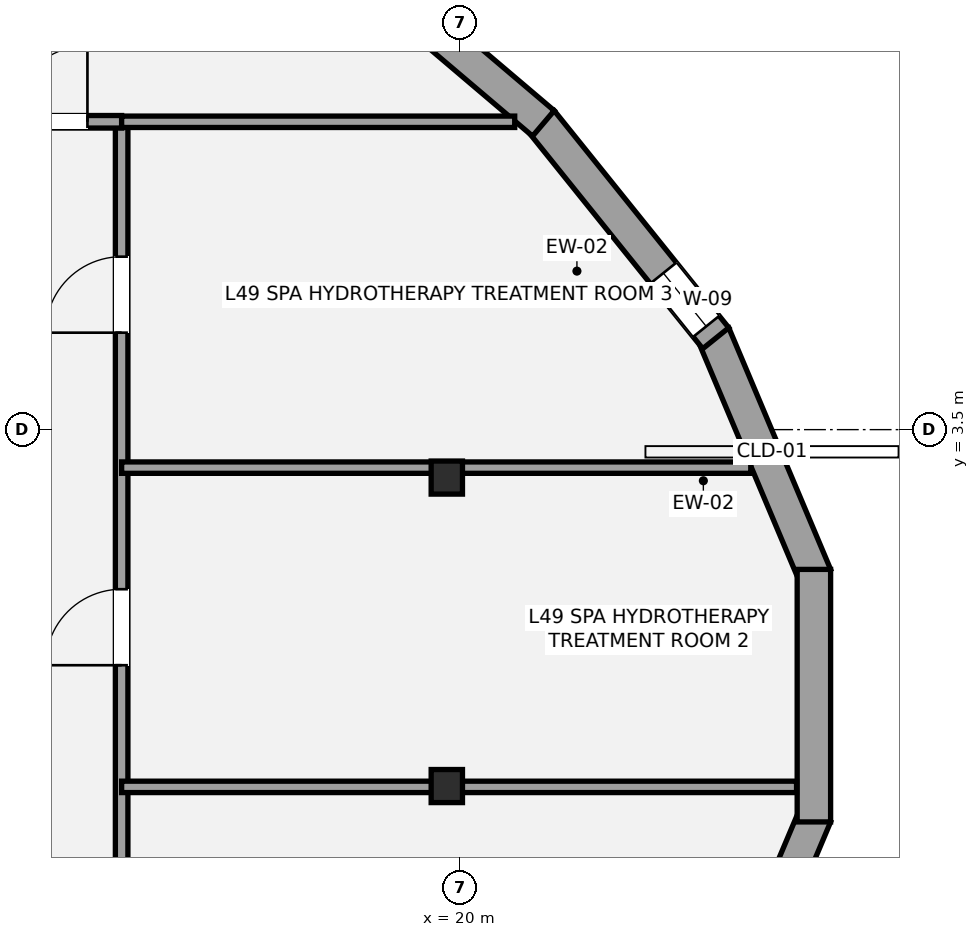
"""IFC4 building model, lengths in metres.
Left out: names, types, materials, properties, quantities, classifications, styles, units other than length and angle.
Written with IfcOpenShell. Run it as: python <this file> out.ifc"""

import sys

from ifc_helpers import new_model, si_unit, direction, frame, frame_2d, origin, origin_2d, place, context, subcontext, project, spatial, rectangle, i_section, extrude, element, fill, save


model = new_model("IFC4")
c1 = context("Model", 3, precision=1e-05, world=origin(), true_north=direction((0.0, 1.0)))
c2 = subcontext(c1, "Body", "Model", "MODEL_VIEW")
j1 = project(units=[si_unit("LENGTHUNIT", "METRE"), si_unit("PLANEANGLEUNIT", "RADIAN")], contexts=[c1])
p1 = place(None, origin())
s1 = spatial("IfcSite", under=j1, at=p1, CompositionType="ELEMENT")
p2 = place(p1, origin())
s2 = spatial("IfcBuilding", under=s1, at=p2, CompositionType="ELEMENT")
p3 = place(p2, frame((0.0, 0.0, 179.0)))
s3 = spatial("IfcBuildingStorey", under=s2, at=p3, CompositionType="ELEMENT", Elevation=179.0)
for number, where, z_axis, x_axis in (
    (1, (19.828, 2.869, 0.0), (0.0, 0.0, 1.0), (1.0, 0.0, 0.0)),
    (2, (19.828, -1.189, 0.0), (0.0, 0.0, 1.0), (1.0, 0.0, 0.0)),
):
    element("IfcColumn", number, at=place(p3, frame(where, z_axis=z_axis, x_axis=x_axis)), inside=s3, PredefinedType="COLUMN", context=c2, shape_type="SweptSolid", body=[
        extrude(i_section(OverallWidth=0.412, OverallDepth=0.435, WebThickness=0.036, FlangeThickness=0.057, at=origin_2d()), origin(), (0.0, 0.0, 1.0), 3.2),
    ])
p4 = place(p3, frame((23.335, 4.755, 0.0), z_axis=(0.0, 0.0, 1.0), x_axis=(0.388360687569, -0.9215074478, 0.0)))
e3 = element("IfcWall", 3, at=p4, inside=s3, PredefinedType="STANDARD", context=c2, shape_type="SweptSolid", body=[
    extrude(rectangle(XDim=3.45, YDim=0.44, at=frame_2d((1.725, 0.0))), origin(), (0.0, 0.0, 1.0), 2.315),
])
p5 = place(p3, frame((21.07, 7.559, 0.0), z_axis=(0.0, 0.0, 1.0), x_axis=(0.626642586146, -0.779306787618, 0.0)))
e4 = element("IfcWall", 4, at=p5, inside=s3, PredefinedType="STANDARD", context=c2, shape_type="SweptSolid", body=[
    extrude(rectangle(XDim=3.665, YDim=0.44, at=frame_2d((1.833, 0.0))), origin(), (0.0, 0.0, 1.0), 2.315),
])
p6 = place(p5, frame((2.565, 0.0, 0.42)))
e5 = element("IfcOpeningElement", 5, at=p6, cuts=e4, PredefinedType="OPENING", context=c2, shape_type="SweptSolid", body=[
    extrude(rectangle(XDim=0.9, YDim=1.35, at=frame_2d((0.45, 0.675))), frame((0.0, 0.23, 0.0), z_axis=(0.0, -1.0, 0.0), x_axis=(1.0, 0.0, 0.0)), (0.0, 0.0, 1.0), 0.46),
])
p7 = place(p3, frame((18.166, 10.018, 0.0), z_axis=(0.0, 0.0, 1.0), x_axis=(0.762499647343, -0.646988630349, 0.0)))
e6 = element("IfcWall", 6, at=p7, inside=s3, PredefinedType="STANDARD", context=c2, shape_type="SweptSolid", body=[
    extrude(rectangle(XDim=3.847, YDim=0.44, at=frame_2d((1.923, 0.0))), origin(), (0.0, 0.0, 1.0), 2.315),
])
p8 = place(p3, frame((24.675, -1.576, 0.0), z_axis=(0.0, 0.0, 1.0), x_axis=(-0.388360687569, -0.9215074478, 0.0)))
e7 = element("IfcWall", 7, at=p8, inside=s3, PredefinedType="STANDARD", context=c2, shape_type="SweptSolid", body=[
    extrude(rectangle(XDim=3.45, YDim=0.44, at=frame_2d((1.725, 0.0))), origin(), (0.0, 0.0, 1.0), 2.315),
])
p9 = place(p3, frame((24.658, 1.661, 0.0), z_axis=(0.0, 0.0, 1.0), x_axis=(0.0, -1.0, 0.0)))
e8 = element("IfcWall", 8, at=p9, inside=s3, PredefinedType="STANDARD", context=c2, shape_type="SweptSolid", body=[
    extrude(rectangle(XDim=3.322, YDim=0.44, at=frame_2d((1.661, 0.0))), origin(), (0.0, 0.0, 1.0), 2.315),
])
p10 = place(p3, frame((15.55, -11.514, 0.0), z_axis=(0.0, 0.0, 1.0), x_axis=(0.0, 1.0, 0.0)))
e9 = element("IfcWall", 9, at=p10, inside=s3, PredefinedType="PARTITIONING", context=c2, shape_type="SweptSolid", body=[
    extrude(rectangle(XDim=19.064, YDim=0.165, at=frame_2d((9.532, 0.0))), origin(), (0.0, 0.0, 1.0), 2.473),
])
p11 = place(p10, frame((4.365, 0.0, 0.0)))
e10 = element("IfcOpeningElement", 10, at=p11, cuts=e9, PredefinedType="OPENING", context=c2, shape_type="SweptSolid", body=[
    extrude(rectangle(XDim=0.85, YDim=2.1, at=frame_2d((0.425, 1.05))), frame((0.0, 0.093, 0.0), z_axis=(0.0, -1.0, 0.0), x_axis=(1.0, 0.0, 0.0)), (0.0, 0.0, 1.0), 0.185),
])
p12 = place(p10, frame((7.515, 0.0, 0.0)))
e11 = element("IfcOpeningElement", 11, at=p12, cuts=e9, PredefinedType="OPENING", context=c2, shape_type="SweptSolid", body=[
    extrude(rectangle(XDim=1.0, YDim=2.15, at=frame_2d((0.5, 1.075))), frame((0.0, 0.093, 0.0), z_axis=(0.0, -1.0, 0.0), x_axis=(1.0, 0.0, 0.0)), (0.0, 0.0, 1.0), 0.185),
])
p13 = place(p10, frame((11.915, 0.0, 0.0)))
e12 = element("IfcOpeningElement", 12, at=p13, cuts=e9, PredefinedType="OPENING", context=c2, shape_type="SweptSolid", body=[
    extrude(rectangle(XDim=1.0, YDim=2.15, at=frame_2d((0.5, 1.075))), frame((0.0, 0.093, 0.0), z_axis=(0.0, -1.0, 0.0), x_axis=(1.0, 0.0, 0.0)), (0.0, 0.0, 1.0), 0.185),
])
p14 = place(p10, frame((16.29, 0.0, 0.0)))
e13 = element("IfcOpeningElement", 13, at=p14, cuts=e9, PredefinedType="OPENING", context=c2, shape_type="SweptSolid", body=[
    extrude(rectangle(XDim=1.0, YDim=2.15, at=frame_2d((0.5, 1.075))), frame((0.0, 0.093, 0.0), z_axis=(0.0, -1.0, 0.0), x_axis=(1.0, 0.0, 0.0)), (0.0, 0.0, 1.0), 0.185),
])
p15 = place(p3, frame((13.8, 7.55, 0.0), z_axis=(0.0, 0.0, 1.0), x_axis=(1.0, 0.0, 0.0)))
e14 = element("IfcWall", 14, at=p15, inside=s3, PredefinedType="PARTITIONING", context=c2, shape_type="SweptSolid", body=[
    extrude(rectangle(XDim=1.75, YDim=0.165, at=frame_2d((0.875, 0.0))), origin(), (0.0, 0.0, 1.0), 3.02),
])
p16 = place(p15, frame((0.3, 0.0, 0.0)))
e15 = element("IfcOpeningElement", 15, at=p16, cuts=e14, PredefinedType="OPENING", context=c2, shape_type="SweptSolid", body=[
    extrude(rectangle(XDim=1.0, YDim=2.15, at=frame_2d((0.5, 1.075))), frame((0.0, 0.093, 0.0), z_axis=(0.0, -1.0, 0.0), x_axis=(1.0, 0.0, 0.0)), (0.0, 0.0, 1.0), 0.185),
])
p17 = place(p3, frame((15.55, 7.55, 0.0), z_axis=(0.0, 0.0, 1.0), x_axis=(1.0, 0.0, 0.0)))
e16 = element("IfcWall", 16, at=p17, inside=s3, PredefinedType="PLUMBINGWALL", context=c2, shape_type="SweptSolid", body=[
    extrude(rectangle(XDim=5.172, YDim=0.15, at=frame_2d((2.586, 0.0))), origin(), (0.0, 0.0, 1.0), 2.473),
])
p18 = place(p3, frame((15.55, -1.2, 0.0), z_axis=(0.0, 0.0, 1.0), x_axis=(1.0, 0.0, 0.0)))
e17 = element("IfcWall", 17, at=p18, inside=s3, PredefinedType="PLUMBINGWALL", context=c2, shape_type="SweptSolid", body=[
    extrude(rectangle(XDim=8.88, YDim=0.15, at=frame_2d((4.44, 0.0))), origin(), (0.0, 0.0, 1.0), 2.398),
])
p19 = place(p3, frame((15.55, 3.0, 0.0), z_axis=(0.0, 0.0, 1.0), x_axis=(1.0, 0.0, 0.0)))
e18 = element("IfcWall", 18, at=p19, inside=s3, PredefinedType="PLUMBINGWALL", context=c2, shape_type="SweptSolid", body=[
    extrude(rectangle(XDim=8.278, YDim=0.15, at=frame_2d((4.139, 0.0))), origin(), (0.0, 0.0, 1.0), 2.473),
])
p20 = place(p6, origin())
e19 = element("IfcWindow", 19, at=p20, inside=s3, PartitioningType="SINGLE_PANEL", PredefinedType="WINDOW", context=c2, shape_type="SweptSolid", body=[
    extrude(rectangle(XDim=0.9, YDim=1.35, at=frame_2d((0.45, 0.675))), frame((0.0, -0.01, 0.0), z_axis=(0.0, -1.0, 0.0), x_axis=(1.0, 0.0, 0.0)), (0.0, 0.0, 1.0), 0.06),
])
fill(e5, e19)
p21 = place(p16, origin())
e20 = element("IfcDoor", 20, at=p21, inside=s3, OperationType="SINGLE_SWING_RIGHT", PredefinedType="DOOR", context=c2, shape_type="SweptSolid", body=[
    extrude(rectangle(XDim=1.0, YDim=2.15, at=frame_2d((0.5, 1.075))), frame((0.0, 0.025, 0.0), z_axis=(0.0, -1.0, 0.0), x_axis=(1.0, 0.0, 0.0)), (0.0, 0.0, 1.0), 0.05),
])
fill(e15, e20)
p22 = place(p13, origin())
e21 = element("IfcDoor", 21, at=p22, inside=s3, OperationType="SINGLE_SWING_LEFT", PredefinedType="DOOR", context=c2, shape_type="SweptSolid", body=[
    extrude(rectangle(XDim=1.0, YDim=2.15, at=frame_2d((0.5, 1.075))), frame((0.0, 0.025, 0.0), z_axis=(0.0, -1.0, 0.0), x_axis=(1.0, 0.0, 0.0)), (0.0, 0.0, 1.0), 0.05),
])
fill(e12, e21)
p23 = place(p14, origin())
e22 = element("IfcDoor", 22, at=p23, inside=s3, OperationType="SINGLE_SWING_LEFT", PredefinedType="DOOR", context=c2, shape_type="SweptSolid", body=[
    extrude(rectangle(XDim=1.0, YDim=2.15, at=frame_2d((0.5, 1.075))), frame((0.0, 0.025, 0.0), z_axis=(0.0, -1.0, 0.0), x_axis=(1.0, 0.0, 0.0)), (0.0, 0.0, 1.0), 0.05),
])
fill(e13, e22)
save(model, sys.argv[1])
